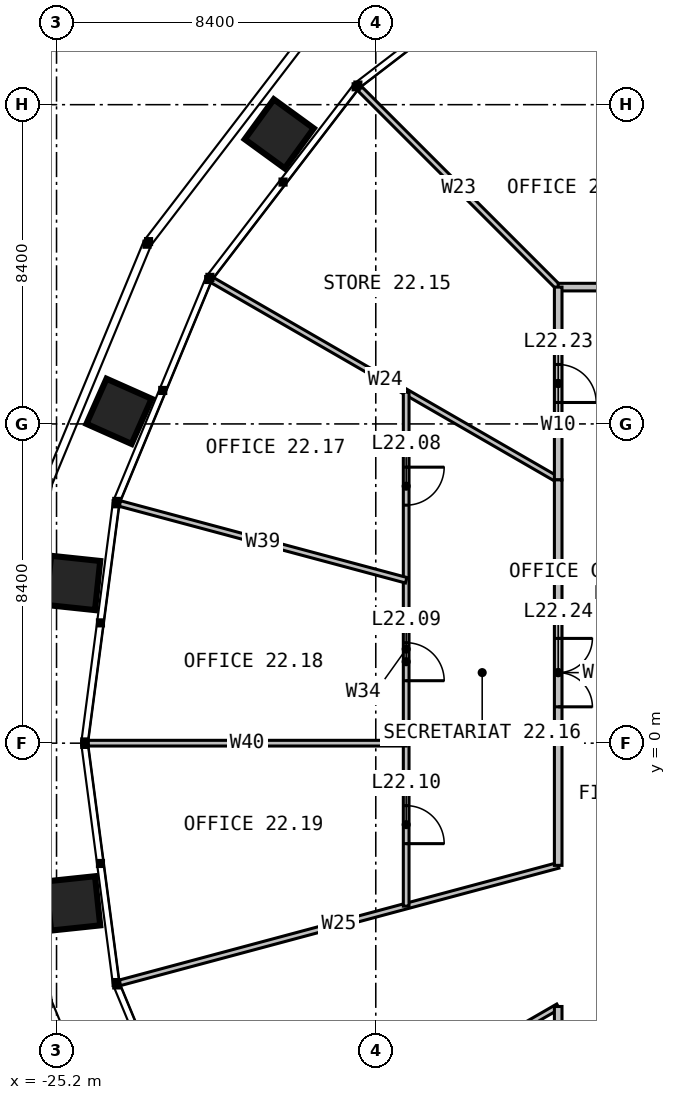
"""IFC4 building model, lengths in metres.
Left out: names, types, materials, properties, quantities, classifications, styles, units other than length and angle.
Written with IfcOpenShell. Run it as: python <this file> out.ifc"""

import sys

from ifc_helpers import new_model, si_unit, direction, frame, frame_2d, origin, place, context, subcontext, project, spatial, rectangle, extrude, element, fill, save


model = new_model("IFC4")
c1 = context("Model", 3, precision=1e-05, world=origin(), true_north=direction((0.0, 1.0)))
c2 = subcontext(c1, "Body", "Model", "MODEL_VIEW")
j1 = project(units=[si_unit("LENGTHUNIT", "METRE"), si_unit("PLANEANGLEUNIT", "RADIAN")], contexts=[c1])
p1 = place(None, origin())
s1 = spatial("IfcSite", under=j1, at=p1, CompositionType="ELEMENT")
p2 = place(p1, origin())
s2 = spatial("IfcBuilding", under=s1, at=p2, CompositionType="ELEMENT")
p3 = place(p2, frame((0.0, 0.0, 94.0)))
s3 = spatial("IfcBuildingStorey", under=s2, at=p3, CompositionType="ELEMENT", Elevation=94.0)
p4 = place(p3, frame((-6.928, 12.0, 0.0), z_axis=(0.0, 0.0, 1.0), x_axis=(-0.499995153367, 0.866028201971, 0.0)))
e1 = element("IfcWall", 1, at=p4, inside=s3, PredefinedType="PARTITIONING", context=c2, shape_type="SweptSolid", body=[
    extrude(rectangle(XDim=10.514, YDim=0.15, at=frame_2d((5.257, 0.0))), origin(), (0.0, 0.0, 1.0), 2.79),
])
p5 = place(p3, frame((-12.0, 12.0, 0.0), z_axis=(0.0, 0.0, 1.0), x_axis=(-0.707106781187, 0.707106781187, 0.0)))
e2 = element("IfcWall", 2, at=p5, inside=s3, PredefinedType="PARTITIONING", context=c2, shape_type="SweptSolid", body=[
    extrude(rectangle(XDim=7.4, YDim=0.15, at=frame_2d((3.7, 0.0))), origin(), (0.0, 0.0, 1.0), 2.79),
])
p6 = place(p3, frame((-12.0, 6.928, 0.0), z_axis=(0.0, 0.0, 1.0), x_axis=(-0.866028201971, 0.499995153367, 0.0)))
e3 = element("IfcWall", 3, at=p6, inside=s3, PredefinedType="PARTITIONING", context=c2, shape_type="SweptSolid", body=[
    extrude(rectangle(XDim=10.514, YDim=0.15, at=frame_2d((5.257, 0.0))), origin(), (0.0, 0.0, 1.0), 2.79),
])
p7 = place(p3, frame((-12.0, -3.215, 0.0), z_axis=(0.0, 0.0, 1.0), x_axis=(-0.965926615498, -0.258816099716, 0.0)))
e4 = element("IfcWall", 4, at=p7, inside=s3, PredefinedType="PARTITIONING", context=c2, shape_type="SweptSolid", body=[
    extrude(rectangle(XDim=11.947, YDim=0.15, at=frame_2d((5.973, 0.0))), origin(), (0.0, 0.0, 1.0), 2.79),
])
p8 = place(p3, frame((-12.0, -6.928, 0.0), z_axis=(0.0, 0.0, 1.0), x_axis=(-0.866028201971, -0.499995153367, 0.0)))
e5 = element("IfcWall", 5, at=p8, inside=s3, PredefinedType="PARTITIONING", context=c2, shape_type="SweptSolid", body=[
    extrude(rectangle(XDim=10.514, YDim=0.15, at=frame_2d((5.257, 0.0))), origin(), (0.0, 0.0, 1.0), 2.79),
])
p9 = place(p3, frame((-6.928, 12.0, 0.0), z_axis=(0.0, 0.0, 1.0), x_axis=(-1.0, 0.0, 0.0)))
e6 = element("IfcWall", 6, at=p9, inside=s3, PredefinedType="PARTITIONING", context=c2, shape_type="SweptSolid", body=[
    extrude(rectangle(XDim=5.072, YDim=0.2, at=frame_2d((2.536, 0.0))), origin(), (0.0, 0.0, 1.0), 3.8),
])
p10 = place(p9, frame((2.036, 0.0, 0.0)))
e7 = element("IfcOpeningElement", 7, at=p10, cuts=e6, PredefinedType="OPENING", context=c2, shape_type="SweptSolid", body=[
    extrude(rectangle(XDim=1.0, YDim=2.2, at=frame_2d((0.5, 1.1))), frame((0.0, 0.11, 0.0), z_axis=(0.0, -1.0, 0.0), x_axis=(1.0, 0.0, 0.0)), (0.0, 0.0, 1.0), 0.22),
])
p11 = place(p3, frame((-12.0, 12.0, 0.0), z_axis=(0.0, 0.0, 1.0), x_axis=(0.0, -1.0, 0.0)))
e8 = element("IfcWall", 8, at=p11, inside=s3, PredefinedType="PARTITIONING", context=c2, shape_type="SweptSolid", body=[
    extrude(rectangle(XDim=5.072, YDim=0.2, at=frame_2d((2.536, 0.0))), origin(), (0.0, 0.0, 1.0), 3.8),
])
p12 = place(p11, frame((2.036, 0.0, 0.0)))
e9 = element("IfcOpeningElement", 9, at=p12, cuts=e8, PredefinedType="OPENING", context=c2, shape_type="SweptSolid", body=[
    extrude(rectangle(XDim=1.0, YDim=2.2, at=frame_2d((0.5, 1.1))), frame((0.0, 0.11, 0.0), z_axis=(0.0, -1.0, 0.0), x_axis=(1.0, 0.0, 0.0)), (0.0, 0.0, 1.0), 0.22),
])
p13 = place(p3, frame((-16.0, 9.238, 0.0), z_axis=(0.0, 0.0, 1.0), x_axis=(0.0, -1.0, 0.0)))
e10 = element("IfcWall", 10, at=p13, inside=s3, PredefinedType="PARTITIONING", context=c2, shape_type="SweptSolid", body=[
    extrude(rectangle(XDim=13.525, YDim=0.15, at=frame_2d((6.762, 0.0))), origin(), (0.0, 0.0, 1.0), 2.79),
])
p14 = place(p13, frame((1.975, 0.0, 0.0)))
e11 = element("IfcOpeningElement", 11, at=p14, cuts=e10, PredefinedType="OPENING", context=c2, shape_type="SweptSolid", body=[
    extrude(rectangle(XDim=1.0, YDim=2.2, at=frame_2d((0.5, 1.1))), frame((0.0, 0.085, 0.0), z_axis=(0.0, -1.0, 0.0), x_axis=(1.0, 0.0, 0.0)), (0.0, 0.0, 1.0), 0.17),
])
p15 = place(p13, frame((6.594, 0.0, 0.0)))
e12 = element("IfcOpeningElement", 12, at=p15, cuts=e10, PredefinedType="OPENING", context=c2, shape_type="SweptSolid", body=[
    extrude(rectangle(XDim=1.0, YDim=2.2, at=frame_2d((0.5, 1.1))), frame((0.0, 0.085, 0.0), z_axis=(0.0, -1.0, 0.0), x_axis=(1.0, 0.0, 0.0)), (0.0, 0.0, 1.0), 0.17),
])
p16 = place(p13, frame((10.881, 0.0, 0.0)))
e13 = element("IfcOpeningElement", 13, at=p16, cuts=e10, PredefinedType="OPENING", context=c2, shape_type="SweptSolid", body=[
    extrude(rectangle(XDim=1.0, YDim=2.2, at=frame_2d((0.5, 1.1))), frame((0.0, 0.085, 0.0), z_axis=(0.0, -1.0, 0.0), x_axis=(1.0, 0.0, 0.0)), (0.0, 0.0, 1.0), 0.17),
])
p17 = place(p3, frame((-16.0, 4.287, 0.0), z_axis=(0.0, 0.0, 1.0), x_axis=(-0.965926412025, 0.258816859097, 0.0)))
e14 = element("IfcWall", 14, at=p17, inside=s3, PredefinedType="PARTITIONING", context=c2, shape_type="SweptSolid", body=[
    extrude(rectangle(XDim=7.806, YDim=0.15, at=frame_2d((3.903, 0.0))), origin(), (0.0, 0.0, 1.0), 2.79),
])
p18 = place(p3, frame((-16.0, 0.0, 0.0), z_axis=(0.0, 0.0, 1.0), x_axis=(-1.0, 0.0, 0.0)))
e15 = element("IfcWall", 15, at=p18, inside=s3, PredefinedType="PARTITIONING", context=c2, shape_type="SweptSolid", body=[
    extrude(rectangle(XDim=8.37, YDim=0.15, at=frame_2d((4.185, 0.0))), origin(), (0.0, 0.0, 1.0), 2.79),
])
p19 = place(p3, frame((-12.0, 6.928, 0.0), z_axis=(0.0, 0.0, 1.0), x_axis=(0.0, -1.0, 0.0)))
e16 = element("IfcWall", 16, at=p19, inside=s3, PredefinedType="PARTITIONING", context=c2, shape_type="SweptSolid", body=[
    extrude(rectangle(XDim=10.144, YDim=0.2, at=frame_2d((5.072, 0.0))), origin(), (0.0, 0.0, 1.0), 3.8),
])
p20 = place(p19, frame((4.172, 0.0, 0.0)))
e17 = element("IfcOpeningElement", 17, at=p20, cuts=e16, PredefinedType="OPENING", context=c2, shape_type="SweptSolid", body=[
    extrude(rectangle(XDim=1.8, YDim=2.2, at=frame_2d((0.9, 1.1))), frame((0.0, 0.11, 0.0), z_axis=(0.0, -1.0, 0.0), x_axis=(1.0, 0.0, 0.0)), (0.0, 0.0, 1.0), 0.22),
])
p21 = place(p3, frame((-12.0, -6.928, 0.0), z_axis=(0.0, 0.0, 1.0), x_axis=(0.0, -1.0, 0.0)))
e18 = element("IfcWall", 18, at=p21, inside=s3, PredefinedType="PARTITIONING", context=c2, shape_type="SweptSolid", body=[
    extrude(rectangle(XDim=5.072, YDim=0.2, at=frame_2d((2.536, 0.0))), origin(), (0.0, 0.0, 1.0), 3.8),
])
p22 = place(p21, frame((2.036, 0.0, 0.0)))
e19 = element("IfcOpeningElement", 19, at=p22, cuts=e18, PredefinedType="OPENING", context=c2, shape_type="SweptSolid", body=[
    extrude(rectangle(XDim=1.0, YDim=2.2, at=frame_2d((0.5, 1.1))), frame((0.0, 0.11, 0.0), z_axis=(0.0, -1.0, 0.0), x_axis=(1.0, 0.0, 0.0)), (0.0, 0.0, 1.0), 0.22),
])
p23 = place(p12, origin())
e20 = element("IfcDoor", 20, at=p23, inside=s3, OperationType="SINGLE_SWING_RIGHT", PredefinedType="DOOR", context=c2, shape_type="SweptSolid", body=[
    extrude(rectangle(XDim=1.0, YDim=2.2, at=frame_2d((0.5, 1.1))), frame((0.0, 0.025, 0.0), z_axis=(0.0, -1.0, 0.0), x_axis=(1.0, 0.0, 0.0)), (0.0, 0.0, 1.0), 0.05),
])
fill(e9, e20)
p24 = place(p14, origin())
e21 = element("IfcDoor", 21, at=p24, inside=s3, OperationType="SINGLE_SWING_LEFT", PredefinedType="DOOR", context=c2, shape_type="SweptSolid", body=[
    extrude(rectangle(XDim=1.0, YDim=2.2, at=frame_2d((0.5, 1.1))), frame((0.0, 0.025, 0.0), z_axis=(0.0, -1.0, 0.0), x_axis=(1.0, 0.0, 0.0)), (0.0, 0.0, 1.0), 0.05),
])
fill(e11, e21)
p25 = place(p15, origin())
e22 = element("IfcDoor", 22, at=p25, inside=s3, OperationType="SINGLE_SWING_RIGHT", PredefinedType="DOOR", context=c2, shape_type="SweptSolid", body=[
    extrude(rectangle(XDim=1.0, YDim=2.2, at=frame_2d((0.5, 1.1))), frame((0.0, 0.025, 0.0), z_axis=(0.0, -1.0, 0.0), x_axis=(1.0, 0.0, 0.0)), (0.0, 0.0, 1.0), 0.05),
])
fill(e12, e22)
p26 = place(p16, origin())
e23 = element("IfcDoor", 23, at=p26, inside=s3, OperationType="SINGLE_SWING_RIGHT", PredefinedType="DOOR", context=c2, shape_type="SweptSolid", body=[
    extrude(rectangle(XDim=1.0, YDim=2.2, at=frame_2d((0.5, 1.1))), frame((0.0, 0.025, 0.0), z_axis=(0.0, -1.0, 0.0), x_axis=(1.0, 0.0, 0.0)), (0.0, 0.0, 1.0), 0.05),
])
fill(e13, e23)
p27 = place(p20, origin())
e24 = element("IfcDoor", 24, at=p27, inside=s3, OperationType="DOUBLE_DOOR_SINGLE_SWING", PredefinedType="DOOR", context=c2, shape_type="SweptSolid", body=[
    extrude(rectangle(XDim=1.8, YDim=2.2, at=frame_2d((0.9, 1.1))), frame((0.0, 0.025, 0.0), z_axis=(0.0, -1.0, 0.0), x_axis=(1.0, 0.0, 0.0)), (0.0, 0.0, 1.0), 0.05),
])
fill(e17, e24)
save(model, sys.argv[1])
